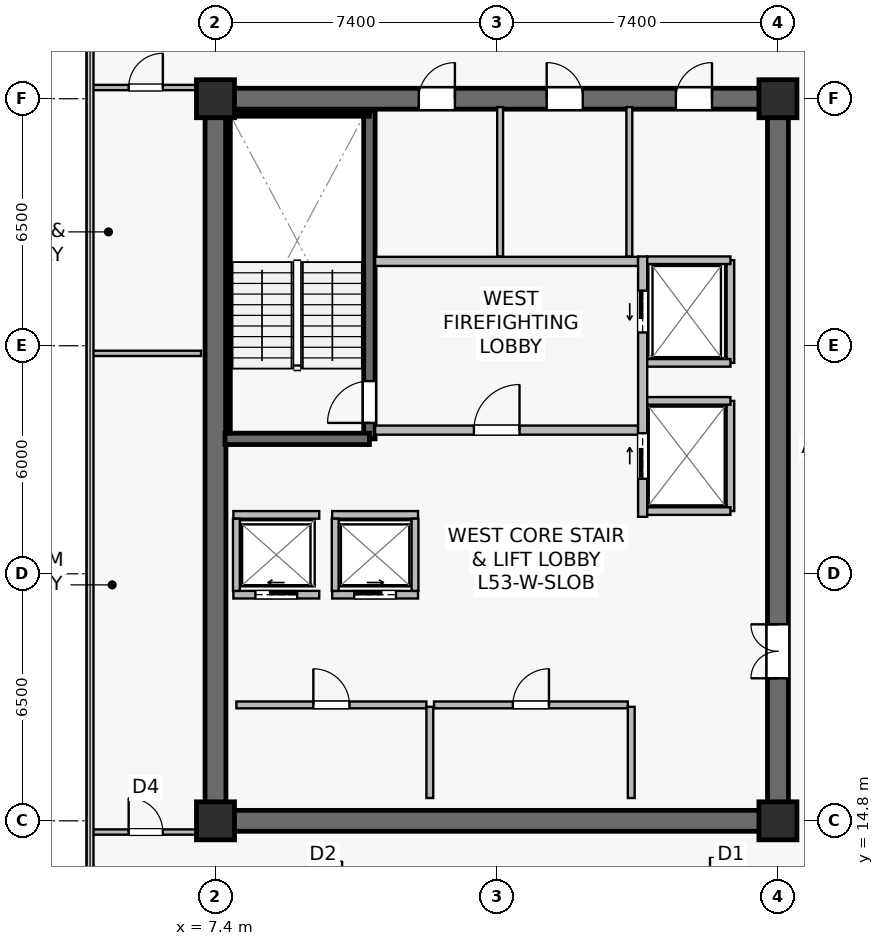
"""IFC4 building model, lengths in metres.
Left out: names, types, materials, properties, quantities, classifications, styles, units other than length and angle.
Written with IfcOpenShell. Run it as: python <this file> out.ifc"""

import sys

from ifc_helpers import new_model, si_unit, direction, frame, frame_2d, origin, origin_2d, place, context, subcontext, project, spatial, rectangle, extrude, source, transform, mapped, element, fill, save


model = new_model("IFC4")
c1 = context("Model", 3, precision=1e-05, world=origin(), true_north=direction((0.0, 1.0)))
c2 = subcontext(c1, "Body", "Model", "MODEL_VIEW")
j1 = project(units=[si_unit("LENGTHUNIT", "METRE"), si_unit("PLANEANGLEUNIT", "RADIAN")], contexts=[c1])
p1 = place(None, origin())
s1 = spatial("IfcSite", under=j1, at=p1, CompositionType="ELEMENT")
p2 = place(p1, origin())
s2 = spatial("IfcBuilding", under=s1, at=p2, CompositionType="ELEMENT")
p3 = place(p2, frame((0.0, 0.0, 221.9)))
s3 = spatial("IfcBuildingStorey", under=s2, at=p3, CompositionType="ELEMENT", Elevation=221.9)
p4 = place(p3, frame((7.125, 14.8, 0.0), z_axis=(0.0, 0.0, 1.0), x_axis=(1.0, 0.0, 0.0)))
e1 = element("IfcWall", 1, at=p4, inside=s3, PredefinedType="SHEAR", context=c2, shape_type="SweptSolid", body=[
    extrude(rectangle(XDim=15.35, YDim=0.55, at=frame_2d((7.675, 0.0))), origin(), (0.0, 0.0, 1.0), 3.8),
])
p5 = place(p3, frame((7.125, 33.8, 0.0), z_axis=(0.0, 0.0, 1.0), x_axis=(1.0, 0.0, 0.0)))
e2 = element("IfcWall", 2, at=p5, inside=s3, PredefinedType="SHEAR", context=c2, shape_type="SweptSolid", body=[
    extrude(rectangle(XDim=15.35, YDim=0.55, at=frame_2d((7.675, 0.0))), origin(), (0.0, 0.0, 1.0), 3.8),
])
p6 = place(p5, frame((5.625, 0.0, 0.0)))
e3 = element("IfcOpeningElement", 3, at=p6, cuts=e2, PredefinedType="OPENING", context=c2, shape_type="SweptSolid", body=[
    extrude(rectangle(XDim=0.95, YDim=2.15, at=frame_2d((0.475, 1.075))), frame((0.0, 0.285, 0.0), z_axis=(0.0, -1.0, 0.0), x_axis=(1.0, 0.0, 0.0)), (0.0, 0.0, 1.0), 0.57),
])
p7 = place(p5, frame((8.99, 0.0, 0.0)))
e4 = element("IfcOpeningElement", 4, at=p7, cuts=e2, PredefinedType="OPENING", context=c2, shape_type="SweptSolid", body=[
    extrude(rectangle(XDim=0.95, YDim=2.15, at=frame_2d((0.475, 1.075))), frame((0.0, 0.285, 0.0), z_axis=(0.0, -1.0, 0.0), x_axis=(1.0, 0.0, 0.0)), (0.0, 0.0, 1.0), 0.57),
])
p8 = place(p5, frame((12.39, 0.0, 0.0)))
e5 = element("IfcOpeningElement", 5, at=p8, cuts=e2, PredefinedType="OPENING", context=c2, shape_type="SweptSolid", body=[
    extrude(rectangle(XDim=0.95, YDim=2.15, at=frame_2d((0.475, 1.075))), frame((0.0, 0.285, 0.0), z_axis=(0.0, -1.0, 0.0), x_axis=(1.0, 0.0, 0.0)), (0.0, 0.0, 1.0), 0.57),
])
p9 = place(p3, frame((7.4, 15.075, 0.0), z_axis=(0.0, 0.0, 1.0), x_axis=(0.0, 1.0, 0.0)))
e6 = element("IfcWall", 6, at=p9, inside=s3, PredefinedType="SHEAR", context=c2, shape_type="SweptSolid", body=[
    extrude(rectangle(XDim=18.45, YDim=0.55, at=frame_2d((9.225, 0.0))), origin(), (0.0, 0.0, 1.0), 3.8),
])
p10 = place(p3, frame((22.2, 15.075, 0.0), z_axis=(0.0, 0.0, 1.0), x_axis=(0.0, 1.0, 0.0)))
e7 = element("IfcWall", 7, at=p10, inside=s3, PredefinedType="SHEAR", context=c2, shape_type="SweptSolid", body=[
    extrude(rectangle(XDim=18.45, YDim=0.55, at=frame_2d((9.225, 0.0))), origin(), (0.0, 0.0, 1.0), 3.8),
])
p11 = place(p10, frame((3.475, 0.0, 0.0)))
e8 = element("IfcOpeningElement", 8, at=p11, cuts=e7, PredefinedType="OPENING", context=c2, shape_type="SweptSolid", body=[
    extrude(rectangle(XDim=1.42, YDim=2.2, at=frame_2d((0.71, 1.1))), frame((0.0, 0.285, 0.0), z_axis=(0.0, -1.0, 0.0), x_axis=(1.0, 0.0, 0.0)), (0.0, 0.0, 1.0), 0.57),
])
p12 = place(p3, frame((11.45, 24.85, 0.0), z_axis=(0.0, 0.0, 1.0), x_axis=(0.0, 1.0, 0.0)))
e9 = element("IfcWall", 9, at=p12, inside=s3, PredefinedType="SHEAR", context=c2, shape_type="SweptSolid", body=[
    extrude(rectangle(XDim=8.63, YDim=0.3, at=frame_2d((4.315, 0.0))), origin(), (0.0, 0.0, 1.0), 3.8),
])
p13 = place(p12, frame((0.42, 0.0, 0.0)))
e10 = element("IfcOpeningElement", 10, at=p13, cuts=e9, PredefinedType="OPENING", context=c2, shape_type="SweptSolid", body=[
    extrude(rectangle(XDim=1.1, YDim=2.15, at=frame_2d((0.55, 1.075))), frame((0.0, 0.16, 0.0), z_axis=(0.0, -1.0, 0.0), x_axis=(1.0, 0.0, 0.0)), (0.0, 0.0, 1.0), 0.32),
])
p14 = place(p3, frame((7.65, 24.85, 0.0), z_axis=(0.0, 0.0, 1.0), x_axis=(1.0, 0.0, 0.0)))
e11 = element("IfcWall", 11, at=p14, inside=s3, PredefinedType="SHEAR", context=c2, shape_type="SweptSolid", body=[
    extrude(rectangle(XDim=3.8, YDim=0.3, at=frame_2d((1.9, 0.0))), origin(), (0.0, 0.0, 1.0), 3.8),
])
p15 = place(p3, frame((7.73, 33.4, 0.0), z_axis=(0.0, 0.0, 1.0), x_axis=(1.0, 0.0, 0.0)))
e12 = element("IfcWall", 12, at=p15, inside=s3, PredefinedType="SOLIDWALL", context=c2, shape_type="SweptSolid", body=[
    extrude(rectangle(XDim=3.72, YDim=0.12, at=frame_2d((1.86, 0.0))), origin(), (0.0, 0.0, 1.0), 3.8),
])
p16 = place(p3, frame((7.73, 25.0, 0.0), z_axis=(0.0, 0.0, 1.0), x_axis=(0.0, 1.0, 0.0)))
e13 = element("IfcWall", 13, at=p16, inside=s3, PredefinedType="SOLIDWALL", context=c2, shape_type="SweptSolid", body=[
    extrude(rectangle(XDim=8.32, YDim=0.12, at=frame_2d((4.16, 0.0))), origin(), (0.0, 0.0, 1.0), 3.8),
])
m1 = source(origin(), c2, "Body", "SweptSolid", [
    extrude(rectangle(XDim=1.0, YDim=1.0, at=origin_2d()), origin(), (0.0, 0.0, 1.0), 4.1),
])
for number, where, z_axis, x_axis in (
    (14, (7.4, 14.8, 0.0), (0.0, 0.0, 1.0), (1.0, 0.0, 0.0)),
    (15, (22.2, 14.8, 0.0), (0.0, 0.0, 1.0), (1.0, 0.0, 0.0)),
    (16, (7.4, 33.8, 0.0), (0.0, 0.0, 1.0), (1.0, 0.0, 0.0)),
    (17, (22.2, 33.8, 0.0), (0.0, 0.0, 1.0), (1.0, 0.0, 0.0)),
):
    element("IfcColumn", number, at=place(p3, frame(where, z_axis=z_axis, x_axis=x_axis)), inside=s3, PredefinedType="COLUMN", context=c2, shape_type="MappedRepresentation", body=[
        mapped(m1, transform((0.0, 0.0, 0.0), scale=1.0)),
    ])
p17 = place(p3, frame((11.6, 25.08, 0.0), z_axis=(0.0, 0.0, 1.0), x_axis=(1.0, 0.0, 0.0)))
e18 = element("IfcWall", 18, at=p17, inside=s3, PredefinedType="SOLIDWALL", context=c2, shape_type="SweptSolid", body=[
    extrude(rectangle(XDim=6.92, YDim=0.24, at=frame_2d((3.46, 0.0))), origin(), (0.0, 0.0, 1.0), 3.197),
])
p18 = place(p17, frame((2.6, 0.0, 0.0)))
e19 = element("IfcOpeningElement", 19, at=p18, cuts=e18, PredefinedType="OPENING", context=c2, shape_type="SweptSolid", body=[
    extrude(rectangle(XDim=1.2, YDim=2.16, at=frame_2d((0.6, 1.08))), frame((0.0, 0.13, 0.0), z_axis=(0.0, -1.0, 0.0), x_axis=(1.0, 0.0, 0.0)), (0.0, 0.0, 1.0), 0.26),
])
p19 = place(p3, frame((11.6, 29.52, 0.0), z_axis=(0.0, 0.0, 1.0), x_axis=(1.0, 0.0, 0.0)))
e20 = element("IfcWall", 20, at=p19, inside=s3, PredefinedType="SOLIDWALL", context=c2, shape_type="SweptSolid", body=[
    extrude(rectangle(XDim=6.92, YDim=0.24, at=frame_2d((3.46, 0.0))), origin(), (0.0, 0.0, 1.0), 3.197),
])
p20 = place(p3, frame((18.64, 22.8, 0.0), z_axis=(0.0, 0.0, 1.0), x_axis=(0.0, 1.0, 0.0)))
e21 = element("IfcWall", 21, at=p20, inside=s3, PredefinedType="SOLIDWALL", context=c2, shape_type="SweptSolid", body=[
    extrude(rectangle(XDim=6.85, YDim=0.24, at=frame_2d((3.425, 0.0))), origin(), (0.0, 0.0, 1.0), 2.935),
])
p21 = place(p20, frame((4.85, 0.0, 0.0)))
e22 = element("IfcOpeningElement", 22, at=p21, cuts=e21, PredefinedType="OPENING", context=c2, shape_type="SweptSolid", body=[
    extrude(rectangle(XDim=1.1, YDim=2.22, at=frame_2d((0.55, 1.11))), frame((0.0, 0.13, 0.0), z_axis=(0.0, -1.0, 0.0), x_axis=(1.0, 0.0, 0.0)), (0.0, 0.0, 1.0), 0.26),
])
p22 = place(p20, frame((1.0, 0.0, 0.0)))
e23 = element("IfcOpeningElement", 23, at=p22, cuts=e21, PredefinedType="OPENING", context=c2, shape_type="SweptSolid", body=[
    extrude(rectangle(XDim=1.2, YDim=2.22, at=frame_2d((0.6, 1.11))), frame((0.0, 0.13, 0.0), z_axis=(0.0, -1.0, 0.0), x_axis=(1.0, 0.0, 0.0)), (0.0, 0.0, 1.0), 0.26),
])
p23 = place(p3, frame((7.87, 20.75, 0.0), z_axis=(0.0, 0.0, 1.0), x_axis=(1.0, 0.0, 0.0)))
e24 = element("IfcWall", 24, at=p23, inside=s3, PredefinedType="SOLIDWALL", context=c2, shape_type="SweptSolid", body=[
    extrude(rectangle(XDim=2.26, YDim=0.2, at=frame_2d((1.13, 0.0))), origin(), (0.0, 0.0, 1.0), 3.8),
])
p24 = place(p23, frame((0.58, 0.0, 0.0)))
e25 = element("IfcOpeningElement", 25, at=p24, cuts=e24, PredefinedType="OPENING", context=c2, shape_type="SweptSolid", body=[
    extrude(rectangle(XDim=1.1, YDim=2.22, at=frame_2d((0.55, 1.11))), frame((0.0, 0.11, 0.0), z_axis=(0.0, -1.0, 0.0), x_axis=(1.0, 0.0, 0.0)), (0.0, 0.0, 1.0), 0.22),
])
p25 = place(p3, frame((7.87, 22.85, 0.0), z_axis=(0.0, 0.0, 1.0), x_axis=(1.0, 0.0, 0.0)))
e26 = element("IfcWall", 26, at=p25, inside=s3, PredefinedType="SOLIDWALL", context=c2, shape_type="SweptSolid", body=[
    extrude(rectangle(XDim=2.26, YDim=0.2, at=frame_2d((1.13, 0.0))), origin(), (0.0, 0.0, 1.0), 3.8),
])
p26 = place(p3, frame((7.95, 20.85, 0.0), z_axis=(0.0, 0.0, 1.0), x_axis=(0.0, 1.0, 0.0)))
e27 = element("IfcWall", 27, at=p26, inside=s3, PredefinedType="SOLIDWALL", context=c2, shape_type="SweptSolid", body=[
    extrude(rectangle(XDim=1.9, YDim=0.18, at=frame_2d((0.95, 0.0))), origin(), (0.0, 0.0, 1.0), 3.8),
])
p27 = place(p3, frame((10.47, 20.75, 0.0), z_axis=(0.0, 0.0, 1.0), x_axis=(1.0, 0.0, 0.0)))
e28 = element("IfcWall", 28, at=p27, inside=s3, PredefinedType="SOLIDWALL", context=c2, shape_type="SweptSolid", body=[
    extrude(rectangle(XDim=2.26, YDim=0.2, at=frame_2d((1.13, 0.0))), origin(), (0.0, 0.0, 1.0), 3.8),
])
p28 = place(p27, frame((0.58, 0.0, 0.0)))
e29 = element("IfcOpeningElement", 29, at=p28, cuts=e28, PredefinedType="OPENING", context=c2, shape_type="SweptSolid", body=[
    extrude(rectangle(XDim=1.1, YDim=2.22, at=frame_2d((0.55, 1.11))), frame((0.0, 0.11, 0.0), z_axis=(0.0, -1.0, 0.0), x_axis=(1.0, 0.0, 0.0)), (0.0, 0.0, 1.0), 0.22),
])
p29 = place(p3, frame((10.47, 22.85, 0.0), z_axis=(0.0, 0.0, 1.0), x_axis=(1.0, 0.0, 0.0)))
e30 = element("IfcWall", 30, at=p29, inside=s3, PredefinedType="SOLIDWALL", context=c2, shape_type="SweptSolid", body=[
    extrude(rectangle(XDim=2.26, YDim=0.2, at=frame_2d((1.13, 0.0))), origin(), (0.0, 0.0, 1.0), 3.8),
])
for number, where, z_axis, x_axis in (
    (31, (10.55, 20.85, 0.0), (0.0, 0.0, 1.0), (0.0, 1.0, 0.0)),
    (32, (12.65, 20.85, 0.0), (0.0, 0.0, 1.0), (0.0, 1.0, 0.0)),
):
    element("IfcWall", number, at=place(p3, frame(where, z_axis=z_axis, x_axis=x_axis)), inside=s3, PredefinedType="SOLIDWALL", context=c2, shape_type="SweptSolid", body=[
        extrude(rectangle(XDim=1.9, YDim=0.18, at=frame_2d((0.95, 0.0))), origin(), (0.0, 0.0, 1.0), 3.8),
    ])
p30 = place(p3, frame((20.95, 26.85, 0.0), z_axis=(0.0, 0.0, 1.0), x_axis=(0.0, 1.0, 0.0)))
e33 = element("IfcWall", 33, at=p30, inside=s3, PredefinedType="SOLIDWALL", context=c2, shape_type="SweptSolid", body=[
    extrude(rectangle(XDim=2.7, YDim=0.2, at=frame_2d((1.35, 0.0))), origin(), (0.0, 0.0, 1.0), 3.8),
])
p31 = place(p3, frame((18.76, 29.55, 0.0), z_axis=(0.0, 0.0, 1.0), x_axis=(1.0, 0.0, 0.0)))
e34 = element("IfcWall", 34, at=p31, inside=s3, PredefinedType="SOLIDWALL", context=c2, shape_type="SweptSolid", body=[
    extrude(rectangle(XDim=2.19, YDim=0.2, at=frame_2d((1.095, 0.0))), origin(), (0.0, 0.0, 1.0), 3.8),
])
p32 = place(p3, frame((18.76, 26.85, 0.0), z_axis=(0.0, 0.0, 1.0), x_axis=(1.0, 0.0, 0.0)))
e35 = element("IfcWall", 35, at=p32, inside=s3, PredefinedType="SOLIDWALL", context=c2, shape_type="SweptSolid", body=[
    extrude(rectangle(XDim=2.19, YDim=0.2, at=frame_2d((1.095, 0.0))), origin(), (0.0, 0.0, 1.0), 3.197),
])
p33 = place(p3, frame((20.95, 22.95, 0.0), z_axis=(0.0, 0.0, 1.0), x_axis=(0.0, 1.0, 0.0)))
e36 = element("IfcWall", 36, at=p33, inside=s3, PredefinedType="SOLIDWALL", context=c2, shape_type="SweptSolid", body=[
    extrude(rectangle(XDim=2.9, YDim=0.2, at=frame_2d((1.45, 0.0))), origin(), (0.0, 0.0, 1.0), 2.935),
])
for number, where, z_axis, x_axis in (
    (37, (18.76, 25.85, 0.0), (0.0, 0.0, 1.0), (1.0, 0.0, 0.0)),
    (38, (18.76, 22.95, 0.0), (0.0, 0.0, 1.0), (1.0, 0.0, 0.0)),
):
    element("IfcWall", number, at=place(p3, frame(where, z_axis=z_axis, x_axis=x_axis)), inside=s3, PredefinedType="SOLIDWALL", context=c2, shape_type="SweptSolid", body=[
        extrude(rectangle(XDim=2.19, YDim=0.2, at=frame_2d((1.095, 0.0))), origin(), (0.0, 0.0, 1.0), 3.8),
    ])
p34 = place(p3, frame((7.95, 17.85, 0.0), z_axis=(0.0, 0.0, 1.0), x_axis=(1.0, 0.0, 0.0)))
e39 = element("IfcWall", 39, at=p34, inside=s3, PredefinedType="SOLIDWALL", context=c2, shape_type="SweptSolid", body=[
    extrude(rectangle(XDim=5.0, YDim=0.18, at=frame_2d((2.5, 0.0))), origin(), (0.0, 0.0, 1.0), 3.8),
])
p35 = place(p34, frame((2.025, 0.0, 0.0)))
e40 = element("IfcOpeningElement", 40, at=p35, cuts=e39, PredefinedType="OPENING", context=c2, shape_type="SweptSolid", body=[
    extrude(rectangle(XDim=0.95, YDim=2.15, at=frame_2d((0.475, 1.075))), frame((0.0, 0.1, 0.0), z_axis=(0.0, -1.0, 0.0), x_axis=(1.0, 0.0, 0.0)), (0.0, 0.0, 1.0), 0.2),
])
p36 = place(p3, frame((13.04, 15.4, 0.0), z_axis=(0.0, 0.0, 1.0), x_axis=(0.0, 1.0, 0.0)))
e41 = element("IfcWall", 41, at=p36, inside=s3, PredefinedType="SOLIDWALL", context=c2, shape_type="SweptSolid", body=[
    extrude(rectangle(XDim=2.4, YDim=0.18, at=frame_2d((1.2, 0.0))), origin(), (0.0, 0.0, 1.0), 3.8),
])
p37 = place(p3, frame((13.15, 17.85, 0.0), z_axis=(0.0, 0.0, 1.0), x_axis=(1.0, 0.0, 0.0)))
e42 = element("IfcWall", 42, at=p37, inside=s3, PredefinedType="SOLIDWALL", context=c2, shape_type="SweptSolid", body=[
    extrude(rectangle(XDim=5.1, YDim=0.18, at=frame_2d((2.55, 0.0))), origin(), (0.0, 0.0, 1.0), 3.197),
])
p38 = place(p37, frame((2.075, 0.0, 0.0)))
e43 = element("IfcOpeningElement", 43, at=p38, cuts=e42, PredefinedType="OPENING", context=c2, shape_type="SweptSolid", body=[
    extrude(rectangle(XDim=0.95, YDim=2.15, at=frame_2d((0.475, 1.075))), frame((0.0, 0.1, 0.0), z_axis=(0.0, -1.0, 0.0), x_axis=(1.0, 0.0, 0.0)), (0.0, 0.0, 1.0), 0.2),
])
p39 = place(p3, frame((18.34, 15.4, 0.0), z_axis=(0.0, 0.0, 1.0), x_axis=(0.0, 1.0, 0.0)))
e44 = element("IfcWall", 44, at=p39, inside=s3, PredefinedType="SOLIDWALL", context=c2, shape_type="SweptSolid", body=[
    extrude(rectangle(XDim=2.4, YDim=0.18, at=frame_2d((1.2, 0.0))), origin(), (0.0, 0.0, 1.0), 3.8),
])
p40 = place(p3, frame((14.89, 29.65, 0.0), z_axis=(0.0, 0.0, 1.0), x_axis=(0.0, 1.0, 0.0)))
e45 = element("IfcWall", 45, at=p40, inside=s3, PredefinedType="PLUMBINGWALL", context=c2, shape_type="SweptSolid", body=[
    extrude(rectangle(XDim=3.93, YDim=0.155, at=frame_2d((1.965, 0.0))), origin(), (0.0, 0.0, 1.0), 3.197),
])
p41 = place(p3, frame((18.29, 29.65, 0.0), z_axis=(0.0, 0.0, 1.0), x_axis=(0.0, 1.0, 0.0)))
e46 = element("IfcWall", 46, at=p41, inside=s3, PredefinedType="PLUMBINGWALL", context=c2, shape_type="SweptSolid", body=[
    extrude(rectangle(XDim=3.93, YDim=0.155, at=frame_2d((1.965, 0.0))), origin(), (0.0, 0.0, 1.0), 3.8),
])
p42 = place(p3, frame((4.11, 27.1, 0.0), z_axis=(0.0, 0.0, 1.0), x_axis=(1.0, 0.0, 0.0)))
e47 = element("IfcWall", 47, at=p42, inside=s3, PredefinedType="PARTITIONING", context=c2, shape_type="SweptSolid", body=[
    extrude(rectangle(XDim=2.91, YDim=0.14, at=frame_2d((1.455, 0.0))), origin(), (0.0, 0.0, 1.0), 3.8),
])
p43 = place(p3, frame((4.11, 14.505, 0.0), z_axis=(0.0, 0.0, 1.0), x_axis=(1.0, 0.0, 0.0)))
e48 = element("IfcWall", 48, at=p43, inside=s3, PredefinedType="PARTITIONING", context=c2, shape_type="SweptSolid", body=[
    extrude(rectangle(XDim=2.91, YDim=0.14, at=frame_2d((1.455, 0.0))), origin(), (0.0, 0.0, 1.0), 3.8),
])
p44 = place(p43, frame((1.005, 0.0, 0.0)))
e49 = element("IfcOpeningElement", 49, at=p44, cuts=e48, PredefinedType="OPENING", context=c2, shape_type="SweptSolid", body=[
    extrude(rectangle(XDim=0.9, YDim=2.1, at=frame_2d((0.45, 1.05))), frame((0.0, 0.08, 0.0), z_axis=(0.0, -1.0, 0.0), x_axis=(1.0, 0.0, 0.0)), (0.0, 0.0, 1.0), 0.16),
])
p45 = place(p3, frame((4.11, 34.095, 0.0), z_axis=(0.0, 0.0, 1.0), x_axis=(1.0, 0.0, 0.0)))
e50 = element("IfcWall", 50, at=p45, inside=s3, PredefinedType="PARTITIONING", context=c2, shape_type="SweptSolid", body=[
    extrude(rectangle(XDim=2.91, YDim=0.14, at=frame_2d((1.455, 0.0))), origin(), (0.0, 0.0, 1.0), 3.8),
])
p46 = place(p45, frame((1.005, 0.0, 0.0)))
e51 = element("IfcOpeningElement", 51, at=p46, cuts=e50, PredefinedType="OPENING", context=c2, shape_type="SweptSolid", body=[
    extrude(rectangle(XDim=0.9, YDim=2.1, at=frame_2d((0.45, 1.05))), frame((0.0, 0.08, 0.0), z_axis=(0.0, -1.0, 0.0), x_axis=(1.0, 0.0, 0.0)), (0.0, 0.0, 1.0), 0.16),
])
m2 = source(origin(), c2, "Body", "SweptSolid", [
    extrude(rectangle(XDim=1.1, YDim=2.15, at=frame_2d((0.55, 1.075))), frame((0.0, 0.025, 0.0), z_axis=(0.0, -1.0, 0.0), x_axis=(1.0, 0.0, 0.0)), (0.0, 0.0, 1.0), 0.05),
])
p47 = place(p13, origin())
e52 = element("IfcDoor", 52, at=p47, inside=s3, OperationType="SINGLE_SWING_LEFT", PredefinedType="DOOR", context=c2, shape_type="MappedRepresentation", body=[
    mapped(m2, transform((0.0, 0.0, 0.0), scale=1.0)),
])
fill(e10, e52)
m3 = source(origin(), c2, "Body", "SweptSolid", [
    extrude(rectangle(XDim=1.2, YDim=2.16, at=frame_2d((0.6, 1.08))), frame((0.0, 0.025, 0.0), z_axis=(0.0, -1.0, 0.0), x_axis=(1.0, 0.0, 0.0)), (0.0, 0.0, 1.0), 0.05),
])
p48 = place(p18, origin())
e53 = element("IfcDoor", 53, at=p48, inside=s3, OperationType="SINGLE_SWING_RIGHT", PredefinedType="DOOR", context=c2, shape_type="MappedRepresentation", body=[
    mapped(m3, transform((0.0, 0.0, 0.0), scale=1.0)),
])
fill(e19, e53)
m4 = source(origin(), c2, "Body", "SweptSolid", [
    extrude(rectangle(XDim=1.1, YDim=2.22, at=frame_2d((0.55, 1.11))), frame((0.0, 0.025, 0.0), z_axis=(0.0, -1.0, 0.0), x_axis=(1.0, 0.0, 0.0)), (0.0, 0.0, 1.0), 0.05),
])
p49 = place(p24, origin())
e54 = element("IfcDoor", 54, at=p49, inside=s3, OperationType="SLIDING_TO_LEFT", PredefinedType="USERDEFINED", context=c2, shape_type="MappedRepresentation", body=[
    mapped(m4, transform((0.0, 0.0, 0.0), scale=1.0)),
])
fill(e25, e54)
p50 = place(p28, origin())
e55 = element("IfcDoor", 55, at=p50, inside=s3, OperationType="SLIDING_TO_RIGHT", PredefinedType="USERDEFINED", context=c2, shape_type="MappedRepresentation", body=[
    mapped(m4, transform((0.0, 0.0, 0.0), scale=1.0)),
])
fill(e29, e55)
p51 = place(p21, origin())
e56 = element("IfcDoor", 56, at=p51, inside=s3, OperationType="SLIDING_TO_LEFT", PredefinedType="USERDEFINED", context=c2, shape_type="MappedRepresentation", body=[
    mapped(m4, transform((0.0, 0.0, 0.0), scale=1.0)),
])
fill(e22, e56)
m5 = source(origin(), c2, "Body", "SweptSolid", [
    extrude(rectangle(XDim=1.2, YDim=2.22, at=frame_2d((0.6, 1.11))), frame((0.0, 0.025, 0.0), z_axis=(0.0, -1.0, 0.0), x_axis=(1.0, 0.0, 0.0)), (0.0, 0.0, 1.0), 0.05),
])
p52 = place(p22, origin())
e57 = element("IfcDoor", 57, at=p52, inside=s3, OperationType="SLIDING_TO_RIGHT", PredefinedType="USERDEFINED", context=c2, shape_type="MappedRepresentation", body=[
    mapped(m5, transform((0.0, 0.0, 0.0), scale=1.0)),
])
fill(e23, e57)
m6 = source(origin(), c2, "Body", "SweptSolid", [
    extrude(rectangle(XDim=0.95, YDim=2.15, at=frame_2d((0.475, 1.075))), frame((0.0, 0.025, 0.0), z_axis=(0.0, -1.0, 0.0), x_axis=(1.0, 0.0, 0.0)), (0.0, 0.0, 1.0), 0.05),
])
p53 = place(p35, origin())
e58 = element("IfcDoor", 58, at=p53, inside=s3, OperationType="SINGLE_SWING_LEFT", PredefinedType="DOOR", context=c2, shape_type="MappedRepresentation", body=[
    mapped(m6, transform((0.0, 0.0, 0.0), scale=1.0)),
])
fill(e40, e58)
p54 = place(p38, origin())
e59 = element("IfcDoor", 59, at=p54, inside=s3, OperationType="SINGLE_SWING_RIGHT", PredefinedType="DOOR", context=c2, shape_type="MappedRepresentation", body=[
    mapped(m6, transform((0.0, 0.0, 0.0), scale=1.0)),
])
fill(e43, e59)
m7 = source(origin(), c2, "Body", "SweptSolid", [
    extrude(rectangle(XDim=1.42, YDim=2.2, at=frame_2d((0.71, 1.1))), frame((0.0, 0.025, 0.0), z_axis=(0.0, -1.0, 0.0), x_axis=(1.0, 0.0, 0.0)), (0.0, 0.0, 1.0), 0.05),
])
p55 = place(p11, origin())
e60 = element("IfcDoor", 60, at=p55, inside=s3, OperationType="DOUBLE_DOOR_SINGLE_SWING", PredefinedType="DOOR", context=c2, shape_type="MappedRepresentation", body=[
    mapped(m7, transform((0.0, 0.0, 0.0), scale=1.0)),
])
fill(e8, e60)
p56 = place(p6, origin())
e61 = element("IfcDoor", 61, at=p56, inside=s3, OperationType="SINGLE_SWING_RIGHT", PredefinedType="DOOR", context=c2, shape_type="MappedRepresentation", body=[
    mapped(m6, transform((0.0, 0.0, 0.0), scale=1.0)),
])
fill(e3, e61)
p57 = place(p7, origin())
e62 = element("IfcDoor", 62, at=p57, inside=s3, OperationType="SINGLE_SWING_LEFT", PredefinedType="DOOR", context=c2, shape_type="MappedRepresentation", body=[
    mapped(m6, transform((0.0, 0.0, 0.0), scale=1.0)),
])
fill(e4, e62)
p58 = place(p8, origin())
e63 = element("IfcDoor", 63, at=p58, inside=s3, OperationType="SINGLE_SWING_RIGHT", PredefinedType="DOOR", context=c2, shape_type="MappedRepresentation", body=[
    mapped(m6, transform((0.0, 0.0, 0.0), scale=1.0)),
])
fill(e5, e63)
m8 = source(origin(), c2, "Body", "SweptSolid", [
    extrude(rectangle(XDim=0.9, YDim=2.1, at=frame_2d((0.45, 1.05))), frame((0.0, 0.025, 0.0), z_axis=(0.0, -1.0, 0.0), x_axis=(1.0, 0.0, 0.0)), (0.0, 0.0, 1.0), 0.05),
])
p59 = place(p44, origin())
e64 = element("IfcDoor", 64, at=p59, inside=s3, OperationType="SINGLE_SWING_LEFT", PredefinedType="DOOR", context=c2, shape_type="MappedRepresentation", body=[
    mapped(m8, transform((0.0, 0.0, 0.0), scale=1.0)),
])
fill(e49, e64)
p60 = place(p46, origin())
e65 = element("IfcDoor", 65, at=p60, inside=s3, OperationType="SINGLE_SWING_RIGHT", PredefinedType="DOOR", context=c2, shape_type="MappedRepresentation", body=[
    mapped(m8, transform((0.0, 0.0, 0.0), scale=1.0)),
])
fill(e51, e65)
save(model, sys.argv[1])
